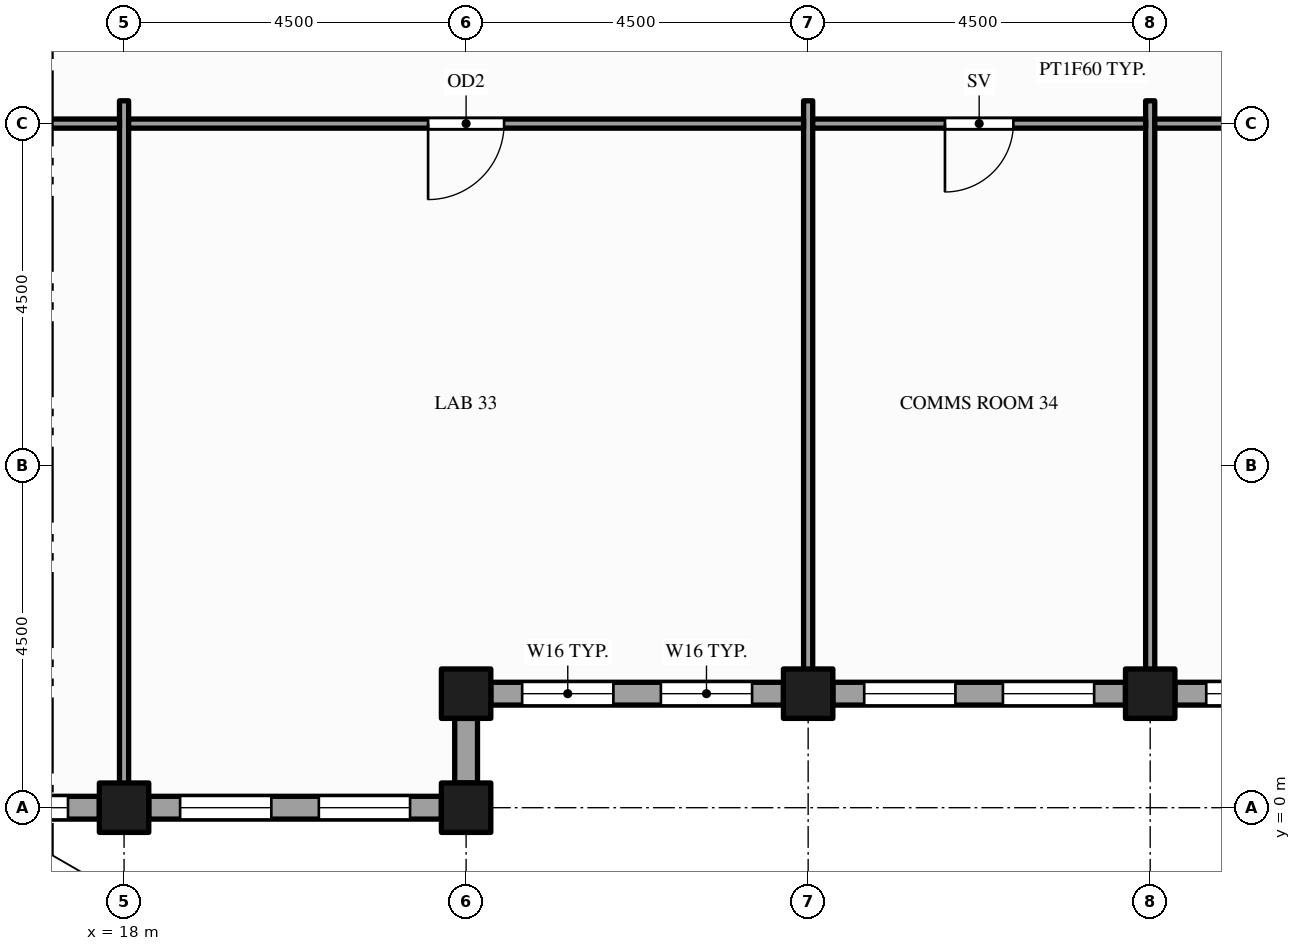
"""IFC4 building model, lengths in metres.
Left out: names, types, materials, properties, quantities, classifications, styles, units other than length and angle.
Written with IfcOpenShell. Run it as: python <this file> out.ifc"""

import sys

from ifc_helpers import new_model, si_unit, direction, frame, frame_2d, origin, origin_2d, place, context, subcontext, project, spatial, rectangle, hollow_rectangle, extrude, element, fill, save


model = new_model("IFC4")
c1 = context("Model", 3, precision=1e-05, world=origin(), true_north=direction((0.0, 1.0)))
c2 = subcontext(c1, "Body", "Model", "MODEL_VIEW")
j1 = project(units=[si_unit("LENGTHUNIT", "METRE"), si_unit("PLANEANGLEUNIT", "RADIAN")], contexts=[c1])
p1 = place(None, origin())
s1 = spatial("IfcSite", under=j1, at=p1, CompositionType="ELEMENT")
p2 = place(p1, origin())
s2 = spatial("IfcBuilding", under=s1, at=p2, CompositionType="ELEMENT")
p3 = place(p2, frame((0.0, 0.0, 249.0)))
s3 = spatial("IfcBuildingStorey", under=s2, at=p3, CompositionType="ELEMENT", Elevation=249.0)
for number, where, z_axis, x_axis in (
    (1, (18.0, 0.0, -0.15), (0.0, 0.0, 1.0), (1.0, 0.0, 0.0)),
    (2, (22.5, 0.0, -0.15), (0.0, 0.0, 1.0), (1.0, 0.0, 0.0)),
    (3, (22.5, 1.5, -0.15), (0.0, 0.0, 1.0), (1.0, 0.0, 0.0)),
    (4, (27.0, 1.5, -0.15), (0.0, 0.0, 1.0), (1.0, 0.0, 0.0)),
    (5, (31.5, 1.5, -0.15), (0.0, 0.0, 1.0), (1.0, 0.0, 0.0)),
):
    element("IfcColumn", number, at=place(p3, frame(where, z_axis=z_axis, x_axis=x_axis)), inside=s3, PredefinedType="COLUMN", context=c2, shape_type="SweptSolid", body=[
        extrude(hollow_rectangle(XDim=0.65, YDim=0.65, WallThickness=0.032, at=origin_2d()), origin(), (0.0, 0.0, 1.0), 4.0),
    ])
p4 = place(p3, frame((22.5, 0.325, 0.0), z_axis=(0.0, 0.0, 1.0), x_axis=(0.0, 1.0, 0.0)))
e6 = element("IfcWall", 6, at=p4, inside=s3, PredefinedType="STANDARD", context=c2, shape_type="SweptSolid", body=[
    extrude(rectangle(XDim=0.85, YDim=0.3, at=frame_2d((0.425, 0.0))), origin(), (0.0, 0.0, 1.0), 3.162),
])
p5 = place(p3, frame((22.825, 1.5, 0.0), z_axis=(0.0, 0.0, 1.0), x_axis=(1.0, 0.0, 0.0)))
e7 = element("IfcWall", 7, at=p5, inside=s3, PredefinedType="STANDARD", context=c2, shape_type="SweptSolid", body=[
    extrude(rectangle(XDim=3.85, YDim=0.3, at=frame_2d((1.925, 0.0))), origin(), (0.0, 0.0, 1.0), 2.87),
])
p6 = place(p5, frame((0.413, 0.0, 0.9)))
e8 = element("IfcOpeningElement", 8, at=p6, cuts=e7, PredefinedType="OPENING", context=c2, shape_type="SweptSolid", body=[
    extrude(rectangle(XDim=1.2, YDim=1.75, at=frame_2d((0.6, 0.875))), frame((0.0, 0.16, 0.0), z_axis=(0.0, -1.0, 0.0), x_axis=(1.0, 0.0, 0.0)), (0.0, 0.0, 1.0), 0.32),
])
p7 = place(p5, frame((2.238, 0.0, 0.9)))
e9 = element("IfcOpeningElement", 9, at=p7, cuts=e7, PredefinedType="OPENING", context=c2, shape_type="SweptSolid", body=[
    extrude(rectangle(XDim=1.2, YDim=1.75, at=frame_2d((0.6, 0.875))), frame((0.0, 0.16, 0.0), z_axis=(0.0, -1.0, 0.0), x_axis=(1.0, 0.0, 0.0)), (0.0, 0.0, 1.0), 0.32),
])
p8 = place(p3, frame((27.325, 1.5, 0.0), z_axis=(0.0, 0.0, 1.0), x_axis=(1.0, 0.0, 0.0)))
e10 = element("IfcWall", 10, at=p8, inside=s3, PredefinedType="STANDARD", context=c2, shape_type="SweptSolid", body=[
    extrude(rectangle(XDim=3.85, YDim=0.3, at=frame_2d((1.925, 0.0))), origin(), (0.0, 0.0, 1.0), 2.87),
])
p9 = place(p8, frame((0.413, 0.0, 0.9)))
e11 = element("IfcOpeningElement", 11, at=p9, cuts=e10, PredefinedType="OPENING", context=c2, shape_type="SweptSolid", body=[
    extrude(rectangle(XDim=1.2, YDim=1.75, at=frame_2d((0.6, 0.875))), frame((0.0, 0.16, 0.0), z_axis=(0.0, -1.0, 0.0), x_axis=(1.0, 0.0, 0.0)), (0.0, 0.0, 1.0), 0.32),
])
p10 = place(p8, frame((2.238, 0.0, 0.9)))
e12 = element("IfcOpeningElement", 12, at=p10, cuts=e10, PredefinedType="OPENING", context=c2, shape_type="SweptSolid", body=[
    extrude(rectangle(XDim=1.2, YDim=1.75, at=frame_2d((0.6, 0.875))), frame((0.0, 0.16, 0.0), z_axis=(0.0, -1.0, 0.0), x_axis=(1.0, 0.0, 0.0)), (0.0, 0.0, 1.0), 0.32),
])
p11 = place(p3, frame((31.825, 1.5, 0.0), z_axis=(0.0, 0.0, 1.0), x_axis=(1.0, 0.0, 0.0)))
e13 = element("IfcWall", 13, at=p11, inside=s3, PredefinedType="STANDARD", context=c2, shape_type="SweptSolid", body=[
    extrude(rectangle(XDim=3.85, YDim=0.3, at=frame_2d((1.925, 0.0))), origin(), (0.0, 0.0, 1.0), 2.87),
])
p12 = place(p11, frame((0.413, 0.0, 0.9)))
e14 = element("IfcOpeningElement", 14, at=p12, cuts=e13, PredefinedType="OPENING", context=c2, shape_type="SweptSolid", body=[
    extrude(rectangle(XDim=1.2, YDim=1.75, at=frame_2d((0.6, 0.875))), frame((0.0, 0.16, 0.0), z_axis=(0.0, -1.0, 0.0), x_axis=(1.0, 0.0, 0.0)), (0.0, 0.0, 1.0), 0.32),
])
p13 = place(p11, frame((2.238, 0.0, 0.9)))
e15 = element("IfcOpeningElement", 15, at=p13, cuts=e13, PredefinedType="OPENING", context=c2, shape_type="SweptSolid", body=[
    extrude(rectangle(XDim=1.2, YDim=1.75, at=frame_2d((0.6, 0.875))), frame((0.0, 0.16, 0.0), z_axis=(0.0, -1.0, 0.0), x_axis=(1.0, 0.0, 0.0)), (0.0, 0.0, 1.0), 0.32),
])
p14 = place(p3, frame((13.825, 0.0, 0.0), z_axis=(0.0, 0.0, 1.0), x_axis=(1.0, 0.0, 0.0)))
e16 = element("IfcWall", 16, at=p14, inside=s3, PredefinedType="STANDARD", context=c2, shape_type="SweptSolid", body=[
    extrude(rectangle(XDim=3.85, YDim=0.3, at=frame_2d((1.925, 0.0))), origin(), (0.0, 0.0, 1.0), 2.87),
])
p15 = place(p14, frame((0.413, 0.0, 0.9)))
e17 = element("IfcOpeningElement", 17, at=p15, cuts=e16, PredefinedType="OPENING", context=c2, shape_type="SweptSolid", body=[
    extrude(rectangle(XDim=1.2, YDim=1.75, at=frame_2d((0.6, 0.875))), frame((0.0, 0.16, 0.0), z_axis=(0.0, -1.0, 0.0), x_axis=(1.0, 0.0, 0.0)), (0.0, 0.0, 1.0), 0.32),
])
p16 = place(p14, frame((2.238, 0.0, 0.9)))
e18 = element("IfcOpeningElement", 18, at=p16, cuts=e16, PredefinedType="OPENING", context=c2, shape_type="SweptSolid", body=[
    extrude(rectangle(XDim=1.2, YDim=1.75, at=frame_2d((0.6, 0.875))), frame((0.0, 0.16, 0.0), z_axis=(0.0, -1.0, 0.0), x_axis=(1.0, 0.0, 0.0)), (0.0, 0.0, 1.0), 0.32),
])
p17 = place(p3, frame((18.325, 0.0, 0.0), z_axis=(0.0, 0.0, 1.0), x_axis=(1.0, 0.0, 0.0)))
e19 = element("IfcWall", 19, at=p17, inside=s3, PredefinedType="STANDARD", context=c2, shape_type="SweptSolid", body=[
    extrude(rectangle(XDim=3.85, YDim=0.3, at=frame_2d((1.925, 0.0))), origin(), (0.0, 0.0, 1.0), 2.87),
])
p18 = place(p17, frame((0.413, 0.0, 0.9)))
e20 = element("IfcOpeningElement", 20, at=p18, cuts=e19, PredefinedType="OPENING", context=c2, shape_type="SweptSolid", body=[
    extrude(rectangle(XDim=1.2, YDim=1.75, at=frame_2d((0.6, 0.875))), frame((0.0, 0.16, 0.0), z_axis=(0.0, -1.0, 0.0), x_axis=(1.0, 0.0, 0.0)), (0.0, 0.0, 1.0), 0.32),
])
p19 = place(p17, frame((2.238, 0.0, 0.9)))
e21 = element("IfcOpeningElement", 21, at=p19, cuts=e19, PredefinedType="OPENING", context=c2, shape_type="SweptSolid", body=[
    extrude(rectangle(XDim=1.2, YDim=1.75, at=frame_2d((0.6, 0.875))), frame((0.0, 0.16, 0.0), z_axis=(0.0, -1.0, 0.0), x_axis=(1.0, 0.0, 0.0)), (0.0, 0.0, 1.0), 0.32),
])
p20 = place(p3, frame((18.0, 0.15, 0.0), z_axis=(0.0, 0.0, 1.0), x_axis=(0.0, 1.0, 0.0)))
e22 = element("IfcWall", 22, at=p20, inside=s3, PredefinedType="PARTITIONING", context=c2, shape_type="SweptSolid", body=[
    extrude(rectangle(XDim=9.15, YDim=0.12, at=frame_2d((4.575, 0.0))), origin(), (0.0, 0.0, 1.0), 2.87),
])
for number, where, z_axis, x_axis in (
    (23, (27.0, 1.65, 0.0), (0.0, 0.0, 1.0), (0.0, 1.0, 0.0)),
    (24, (31.5, 1.65, 0.0), (0.0, 0.0, 1.0), (0.0, 1.0, 0.0)),
):
    element("IfcWall", number, at=place(p3, frame(where, z_axis=z_axis, x_axis=x_axis)), inside=s3, PredefinedType="PARTITIONING", context=c2, shape_type="SweptSolid", body=[
        extrude(rectangle(XDim=7.65, YDim=0.12, at=frame_2d((3.825, 0.0))), origin(), (0.0, 0.0, 1.0), 2.87),
    ])
p21 = place(p3, frame((9.06, 9.0, 0.0), z_axis=(0.0, 0.0, 1.0), x_axis=(1.0, 0.0, 0.0)))
e25 = element("IfcWall", 25, at=p21, inside=s3, PredefinedType="PARTITIONING", context=c2, shape_type="SweptSolid", body=[
    extrude(rectangle(XDim=8.88, YDim=0.12, at=frame_2d((4.44, 0.0))), origin(), (0.0, 0.0, 1.0), 2.87),
])
p22 = place(p21, frame((3.94, 0.0, 0.0)))
e26 = element("IfcOpeningElement", 26, at=p22, cuts=e25, PredefinedType="OPENING", context=c2, shape_type="SweptSolid", body=[
    extrude(rectangle(XDim=1.0, YDim=2.1, at=frame_2d((0.5, 1.05))), frame((0.0, 0.07, 0.0), z_axis=(0.0, -1.0, 0.0), x_axis=(1.0, 0.0, 0.0)), (0.0, 0.0, 1.0), 0.14),
])
p23 = place(p3, frame((18.06, 9.0, 0.0), z_axis=(0.0, 0.0, 1.0), x_axis=(1.0, 0.0, 0.0)))
e27 = element("IfcWall", 27, at=p23, inside=s3, PredefinedType="PARTITIONING", context=c2, shape_type="SweptSolid", body=[
    extrude(rectangle(XDim=8.88, YDim=0.12, at=frame_2d((4.44, 0.0))), origin(), (0.0, 0.0, 1.0), 2.87),
])
p24 = place(p23, frame((3.94, 0.0, 0.0)))
e28 = element("IfcOpeningElement", 28, at=p24, cuts=e27, PredefinedType="OPENING", context=c2, shape_type="SweptSolid", body=[
    extrude(rectangle(XDim=1.0, YDim=2.1, at=frame_2d((0.5, 1.05))), frame((0.0, 0.07, 0.0), z_axis=(0.0, -1.0, 0.0), x_axis=(1.0, 0.0, 0.0)), (0.0, 0.0, 1.0), 0.14),
])
p25 = place(p3, frame((27.06, 9.0, 0.0), z_axis=(0.0, 0.0, 1.0), x_axis=(1.0, 0.0, 0.0)))
e29 = element("IfcWall", 29, at=p25, inside=s3, PredefinedType="PARTITIONING", context=c2, shape_type="SweptSolid", body=[
    extrude(rectangle(XDim=4.38, YDim=0.12, at=frame_2d((2.19, 0.0))), origin(), (0.0, 0.0, 1.0), 2.87),
])
p26 = place(p25, frame((1.74, 0.0, 0.0)))
e30 = element("IfcOpeningElement", 30, at=p26, cuts=e29, PredefinedType="OPENING", context=c2, shape_type="SweptSolid", body=[
    extrude(rectangle(XDim=0.9, YDim=2.1, at=frame_2d((0.45, 1.05))), frame((0.0, 0.07, 0.0), z_axis=(0.0, -1.0, 0.0), x_axis=(1.0, 0.0, 0.0)), (0.0, 0.0, 1.0), 0.14),
])
p27 = place(p3, frame((31.56, 9.0, 0.0), z_axis=(0.0, 0.0, 1.0), x_axis=(1.0, 0.0, 0.0)))
e31 = element("IfcWall", 31, at=p27, inside=s3, PredefinedType="PARTITIONING", context=c2, shape_type="SweptSolid", body=[
    extrude(rectangle(XDim=4.38, YDim=0.12, at=frame_2d((2.19, 0.0))), origin(), (0.0, 0.0, 1.0), 2.87),
])
p28 = place(p27, frame((1.74, 0.0, 0.0)))
e32 = element("IfcOpeningElement", 32, at=p28, cuts=e31, PredefinedType="OPENING", context=c2, shape_type="SweptSolid", body=[
    extrude(rectangle(XDim=0.9, YDim=2.1, at=frame_2d((0.45, 1.05))), frame((0.0, 0.07, 0.0), z_axis=(0.0, -1.0, 0.0), x_axis=(1.0, 0.0, 0.0)), (0.0, 0.0, 1.0), 0.14),
])
p29 = place(p6, origin())
e33 = element("IfcWindow", 33, at=p29, inside=s3, PartitioningType="SINGLE_PANEL", PredefinedType="WINDOW", context=c2, shape_type="SweptSolid", body=[
    extrude(rectangle(XDim=1.2, YDim=1.75, at=frame_2d((0.6, 0.875))), frame((0.0, 0.03, 0.0), z_axis=(0.0, -1.0, 0.0), x_axis=(1.0, 0.0, 0.0)), (0.0, 0.0, 1.0), 0.06),
])
fill(e8, e33)
p30 = place(p7, origin())
e34 = element("IfcWindow", 34, at=p30, inside=s3, PartitioningType="SINGLE_PANEL", PredefinedType="WINDOW", context=c2, shape_type="SweptSolid", body=[
    extrude(rectangle(XDim=1.2, YDim=1.75, at=frame_2d((0.6, 0.875))), frame((0.0, 0.03, 0.0), z_axis=(0.0, -1.0, 0.0), x_axis=(1.0, 0.0, 0.0)), (0.0, 0.0, 1.0), 0.06),
])
fill(e9, e34)
p31 = place(p9, origin())
e35 = element("IfcWindow", 35, at=p31, inside=s3, PartitioningType="SINGLE_PANEL", PredefinedType="WINDOW", context=c2, shape_type="SweptSolid", body=[
    extrude(rectangle(XDim=1.2, YDim=1.75, at=frame_2d((0.6, 0.875))), frame((0.0, 0.03, 0.0), z_axis=(0.0, -1.0, 0.0), x_axis=(1.0, 0.0, 0.0)), (0.0, 0.0, 1.0), 0.06),
])
fill(e11, e35)
p32 = place(p10, origin())
e36 = element("IfcWindow", 36, at=p32, inside=s3, PartitioningType="SINGLE_PANEL", PredefinedType="WINDOW", context=c2, shape_type="SweptSolid", body=[
    extrude(rectangle(XDim=1.2, YDim=1.75, at=frame_2d((0.6, 0.875))), frame((0.0, 0.03, 0.0), z_axis=(0.0, -1.0, 0.0), x_axis=(1.0, 0.0, 0.0)), (0.0, 0.0, 1.0), 0.06),
])
fill(e12, e36)
p33 = place(p12, origin())
e37 = element("IfcWindow", 37, at=p33, inside=s3, PartitioningType="SINGLE_PANEL", PredefinedType="WINDOW", context=c2, shape_type="SweptSolid", body=[
    extrude(rectangle(XDim=1.2, YDim=1.75, at=frame_2d((0.6, 0.875))), frame((0.0, 0.03, 0.0), z_axis=(0.0, -1.0, 0.0), x_axis=(1.0, 0.0, 0.0)), (0.0, 0.0, 1.0), 0.06),
])
fill(e14, e37)
p34 = place(p16, origin())
e38 = element("IfcWindow", 38, at=p34, inside=s3, PartitioningType="SINGLE_PANEL", PredefinedType="WINDOW", context=c2, shape_type="SweptSolid", body=[
    extrude(rectangle(XDim=1.2, YDim=1.75, at=frame_2d((0.6, 0.875))), frame((0.0, 0.03, 0.0), z_axis=(0.0, -1.0, 0.0), x_axis=(1.0, 0.0, 0.0)), (0.0, 0.0, 1.0), 0.06),
])
fill(e18, e38)
p35 = place(p18, origin())
e39 = element("IfcWindow", 39, at=p35, inside=s3, PartitioningType="SINGLE_PANEL", PredefinedType="WINDOW", context=c2, shape_type="SweptSolid", body=[
    extrude(rectangle(XDim=1.2, YDim=1.75, at=frame_2d((0.6, 0.875))), frame((0.0, 0.03, 0.0), z_axis=(0.0, -1.0, 0.0), x_axis=(1.0, 0.0, 0.0)), (0.0, 0.0, 1.0), 0.06),
])
fill(e20, e39)
p36 = place(p19, origin())
e40 = element("IfcWindow", 40, at=p36, inside=s3, PartitioningType="SINGLE_PANEL", PredefinedType="WINDOW", context=c2, shape_type="SweptSolid", body=[
    extrude(rectangle(XDim=1.2, YDim=1.75, at=frame_2d((0.6, 0.875))), frame((0.0, 0.03, 0.0), z_axis=(0.0, -1.0, 0.0), x_axis=(1.0, 0.0, 0.0)), (0.0, 0.0, 1.0), 0.06),
])
fill(e21, e40)
p37 = place(p24, origin())
e41 = element("IfcDoor", 41, at=p37, inside=s3, OperationType="SINGLE_SWING_LEFT", PredefinedType="DOOR", context=c2, shape_type="SweptSolid", body=[
    extrude(rectangle(XDim=1.0, YDim=2.1, at=frame_2d((0.5, 1.05))), frame((0.0, 0.025, 0.0), z_axis=(0.0, -1.0, 0.0), x_axis=(1.0, 0.0, 0.0)), (0.0, 0.0, 1.0), 0.05),
])
fill(e28, e41)
p38 = place(p26, origin())
e42 = element("IfcDoor", 42, at=p38, inside=s3, OperationType="SINGLE_SWING_LEFT", PredefinedType="DOOR", context=c2, shape_type="SweptSolid", body=[
    extrude(rectangle(XDim=0.9, YDim=2.1, at=frame_2d((0.45, 1.05))), frame((0.0, 0.025, 0.0), z_axis=(0.0, -1.0, 0.0), x_axis=(1.0, 0.0, 0.0)), (0.0, 0.0, 1.0), 0.05),
])
fill(e30, e42)
save(model, sys.argv[1])
